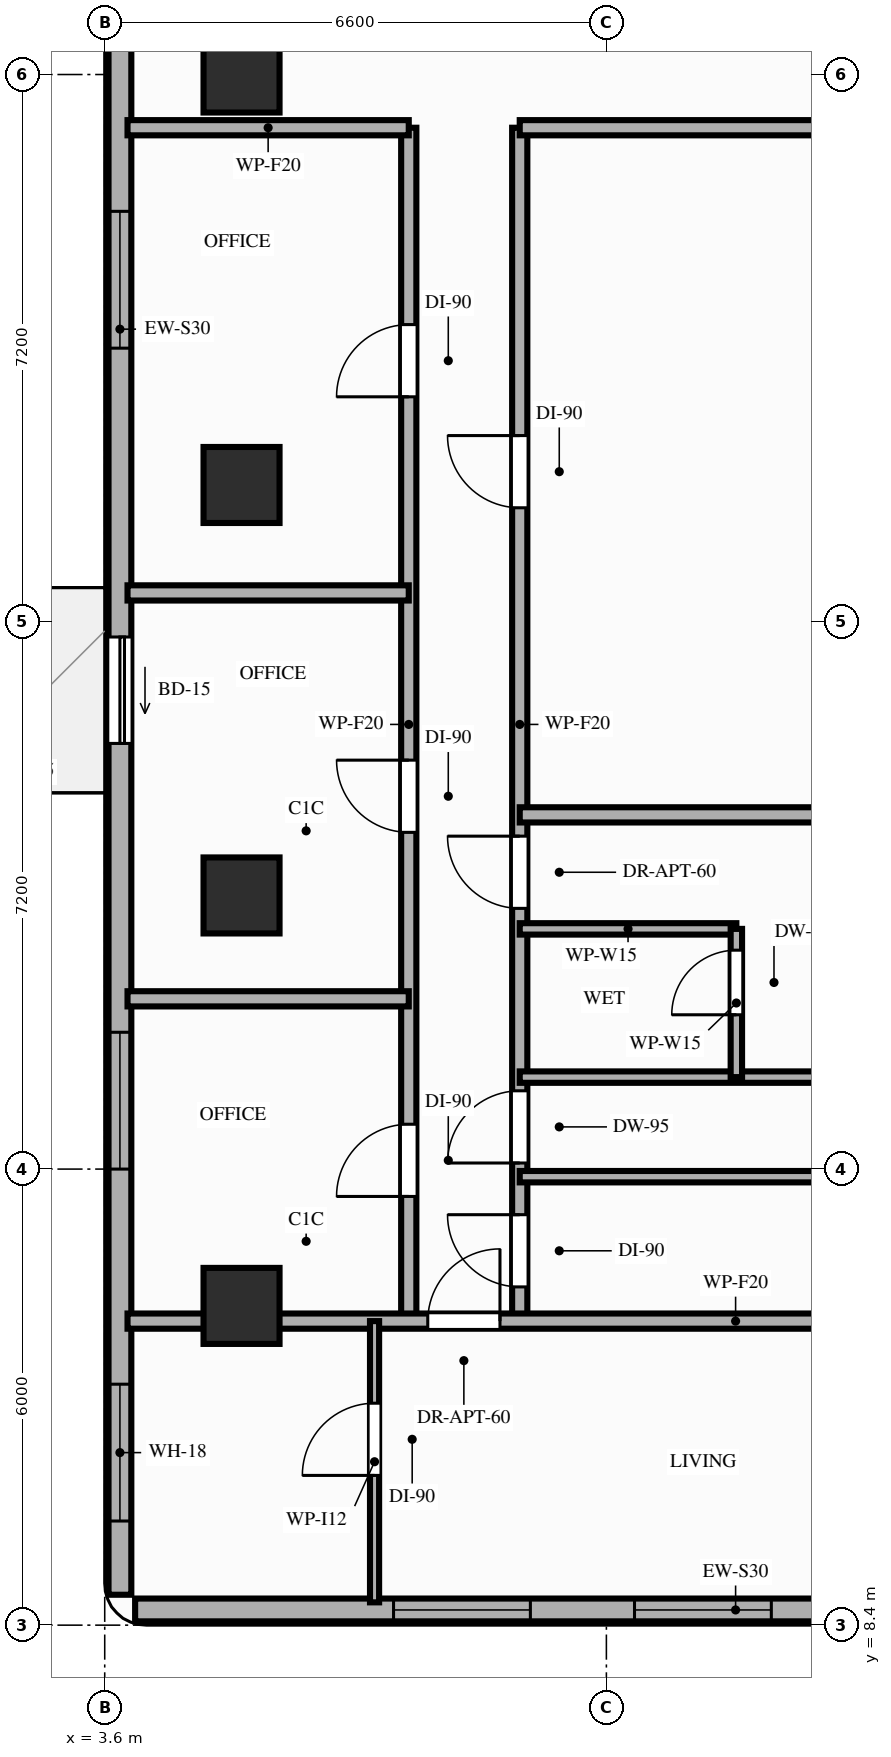
"""IFC4 building model, lengths in metres.
Left out: names, types, materials, properties, quantities, classifications, styles, units other than length and angle.
Written with IfcOpenShell. Run it as: python <this file> out.ifc"""

import sys

from ifc_helpers import new_model, si_unit, direction, frame, frame_2d, origin, origin_2d, place, context, subcontext, project, spatial, rectangle, extrude, element, fill, save


model = new_model("IFC4")
c1 = context("Model", 3, precision=1e-05, world=origin(), true_north=direction((0.0, 1.0)))
c2 = subcontext(c1, "Body", "Model", "MODEL_VIEW")
j1 = project(units=[si_unit("LENGTHUNIT", "METRE"), si_unit("PLANEANGLEUNIT", "RADIAN")], contexts=[c1])
p1 = place(None, origin())
s1 = spatial("IfcSite", under=j1, at=p1, CompositionType="ELEMENT")
p2 = place(p1, origin())
s2 = spatial("IfcBuilding", under=s1, at=p2, CompositionType="ELEMENT")
p3 = place(p2, frame((0.0, 0.0, 126.6)))
s3 = spatial("IfcBuildingStorey", under=s2, at=p3, CompositionType="ELEMENT", Elevation=126.6)
for number, where, z_axis, x_axis in (
    (1, (5.4, 12.6, 0.0), (0.0, 0.0, 1.0), (1.0, 0.0, 0.0)),
    (2, (5.4, 18.0, 0.0), (0.0, 0.0, 1.0), (1.0, 0.0, 0.0)),
    (3, (5.4, 23.4, 0.0), (0.0, 0.0, 1.0), (1.0, 0.0, 0.0)),
    (4, (5.4, 28.8, 0.0), (0.0, 0.0, 1.0), (1.0, 0.0, 0.0)),
):
    element("IfcColumn", number, at=place(p3, frame(where, z_axis=z_axis, x_axis=x_axis)), inside=s3, PredefinedType="COLUMN", context=c2, shape_type="SweptSolid", body=[
        extrude(rectangle(XDim=1.0, YDim=1.0, at=origin_2d()), origin(), (0.0, 0.0, 1.0), 3.2),
    ])
p4 = place(p3, frame((4.0, 8.6, 0.0), z_axis=(0.0, 0.0, 1.0), x_axis=(1.0, 0.0, 0.0)))
e5 = element("IfcWall", 5, at=p4, inside=s3, PredefinedType="STANDARD", context=c2, shape_type="SweptSolid", body=[
    extrude(rectangle(XDim=15.8, YDim=0.3, at=frame_2d((7.9, 0.0))), origin(), (0.0, 0.0, 1.0), 3.02),
])
p5 = place(p4, frame((6.57, 0.0, 0.85)))
e6 = element("IfcOpeningElement", 6, at=p5, cuts=e5, PredefinedType="OPENING", context=c2, shape_type="SweptSolid", body=[
    extrude(rectangle(XDim=1.8, YDim=1.75, at=frame_2d((0.9, 0.875))), frame((0.0, 0.16, 0.0), z_axis=(0.0, -1.0, 0.0), x_axis=(1.0, 0.0, 0.0)), (0.0, 0.0, 1.0), 0.32),
])
p6 = place(p4, frame((3.4, 0.0, 0.85)))
e7 = element("IfcOpeningElement", 7, at=p6, cuts=e5, PredefinedType="OPENING", context=c2, shape_type="SweptSolid", body=[
    extrude(rectangle(XDim=1.8, YDim=1.75, at=frame_2d((0.9, 0.875))), frame((0.0, 0.16, 0.0), z_axis=(0.0, -1.0, 0.0), x_axis=(1.0, 0.0, 0.0)), (0.0, 0.0, 1.0), 0.32),
])
p7 = place(p3, frame((3.8, 42.1, 0.0), z_axis=(0.0, 0.0, 1.0), x_axis=(0.0, -1.0, 0.0)))
e8 = element("IfcWall", 8, at=p7, inside=s3, PredefinedType="STANDARD", context=c2, shape_type="SweptSolid", body=[
    extrude(rectangle(XDim=33.3, YDim=0.3, at=frame_2d((16.65, 0.0))), origin(), (0.0, 0.0, 1.0), 2.71),
])
p8 = place(p7, frame((20.7, 0.0, 0.0)))
e9 = element("IfcOpeningElement", 9, at=p8, cuts=e8, PredefinedType="OPENING", context=c2, shape_type="SweptSolid", body=[
    extrude(rectangle(XDim=1.4, YDim=2.1, at=frame_2d((0.7, 1.05))), frame((0.0, 0.16, 0.0), z_axis=(0.0, -1.0, 0.0), x_axis=(1.0, 0.0, 0.0)), (0.0, 0.0, 1.0), 0.32),
])
p9 = place(p7, frame((30.53, 0.0, 0.85)))
e10 = element("IfcOpeningElement", 10, at=p9, cuts=e8, PredefinedType="OPENING", context=c2, shape_type="SweptSolid", body=[
    extrude(rectangle(XDim=1.8, YDim=1.61, at=frame_2d((0.9, 0.805))), frame((0.0, 0.16, 0.0), z_axis=(0.0, -1.0, 0.0), x_axis=(1.0, 0.0, 0.0)), (0.0, 0.0, 1.0), 0.32),
])
p10 = place(p7, frame((25.9, 0.0, 0.85)))
e11 = element("IfcOpeningElement", 11, at=p10, cuts=e8, PredefinedType="OPENING", context=c2, shape_type="SweptSolid", body=[
    extrude(rectangle(XDim=1.8, YDim=1.61, at=frame_2d((0.9, 0.805))), frame((0.0, 0.16, 0.0), z_axis=(0.0, -1.0, 0.0), x_axis=(1.0, 0.0, 0.0)), (0.0, 0.0, 1.0), 0.32),
])
p11 = place(p7, frame((15.1, 0.0, 0.85)))
e12 = element("IfcOpeningElement", 12, at=p11, cuts=e8, PredefinedType="OPENING", context=c2, shape_type="SweptSolid", body=[
    extrude(rectangle(XDim=1.8, YDim=1.61, at=frame_2d((0.9, 0.805))), frame((0.0, 0.16, 0.0), z_axis=(0.0, -1.0, 0.0), x_axis=(1.0, 0.0, 0.0)), (0.0, 0.0, 1.0), 0.32),
])
p12 = place(p7, frame((9.9, 0.0, 0.85)))
e13 = element("IfcOpeningElement", 13, at=p12, cuts=e8, PredefinedType="OPENING", context=c2, shape_type="SweptSolid", body=[
    extrude(rectangle(XDim=1.8, YDim=1.61, at=frame_2d((0.9, 0.805))), frame((0.0, 0.16, 0.0), z_axis=(0.0, -1.0, 0.0), x_axis=(1.0, 0.0, 0.0)), (0.0, 0.0, 1.0), 0.32),
])
p13 = place(p7, frame((3.8, 0.0, 0.85)))
e14 = element("IfcOpeningElement", 14, at=p13, cuts=e8, PredefinedType="OPENING", context=c2, shape_type="SweptSolid", body=[
    extrude(rectangle(XDim=1.8, YDim=1.61, at=frame_2d((0.9, 0.805))), frame((0.0, 0.16, 0.0), z_axis=(0.0, -1.0, 0.0), x_axis=(1.0, 0.0, 0.0)), (0.0, 0.0, 1.0), 0.32),
])
p14 = place(p3, frame((7.6, 12.4, 0.0), z_axis=(0.0, 0.0, 1.0), x_axis=(0.0, 1.0, 0.0)))
e15 = element("IfcWall", 15, at=p14, inside=s3, PredefinedType="PARTITIONING", context=c2, shape_type="SweptSolid", body=[
    extrude(rectangle(XDim=15.7, YDim=0.2, at=frame_2d((7.85, 0.0))), origin(), (0.0, 0.0, 1.0), 2.45),
])
p15 = place(p14, frame((1.64, 0.0, 0.0)))
e16 = element("IfcOpeningElement", 16, at=p15, cuts=e15, PredefinedType="OPENING", context=c2, shape_type="SweptSolid", body=[
    extrude(rectangle(XDim=0.95, YDim=2.15, at=frame_2d((0.475, 1.075))), frame((0.0, 0.11, 0.0), z_axis=(0.0, -1.0, 0.0), x_axis=(1.0, 0.0, 0.0)), (0.0, 0.0, 1.0), 0.22),
])
p16 = place(p14, frame((6.43, 0.0, 0.0)))
e17 = element("IfcOpeningElement", 17, at=p16, cuts=e15, PredefinedType="OPENING", context=c2, shape_type="SweptSolid", body=[
    extrude(rectangle(XDim=0.95, YDim=2.15, at=frame_2d((0.475, 1.075))), frame((0.0, 0.11, 0.0), z_axis=(0.0, -1.0, 0.0), x_axis=(1.0, 0.0, 0.0)), (0.0, 0.0, 1.0), 0.22),
])
p17 = place(p14, frame((12.16, 0.0, 0.0)))
e18 = element("IfcOpeningElement", 18, at=p17, cuts=e15, PredefinedType="OPENING", context=c2, shape_type="SweptSolid", body=[
    extrude(rectangle(XDim=0.95, YDim=2.15, at=frame_2d((0.475, 1.075))), frame((0.0, 0.11, 0.0), z_axis=(0.0, -1.0, 0.0), x_axis=(1.0, 0.0, 0.0)), (0.0, 0.0, 1.0), 0.22),
])
p18 = place(p3, frame((9.06, 12.4, 0.0), z_axis=(0.0, 0.0, 1.0), x_axis=(0.0, 1.0, 0.0)))
e19 = element("IfcWall", 19, at=p18, inside=s3, PredefinedType="PARTITIONING", context=c2, shape_type="SweptSolid", body=[
    extrude(rectangle(XDim=15.7, YDim=0.2, at=frame_2d((7.85, 0.0))), origin(), (0.0, 0.0, 1.0), 2.45),
])
p19 = place(p18, frame((0.45, 0.0, 0.0)))
e20 = element("IfcOpeningElement", 20, at=p19, cuts=e19, PredefinedType="OPENING", context=c2, shape_type="SweptSolid", body=[
    extrude(rectangle(XDim=0.95, YDim=2.15, at=frame_2d((0.475, 1.075))), frame((0.0, 0.11, 0.0), z_axis=(0.0, -1.0, 0.0), x_axis=(1.0, 0.0, 0.0)), (0.0, 0.0, 1.0), 0.22),
])
p20 = place(p18, frame((2.08, 0.0, 0.0)))
e21 = element("IfcOpeningElement", 21, at=p20, cuts=e19, PredefinedType="OPENING", context=c2, shape_type="SweptSolid", body=[
    extrude(rectangle(XDim=0.95, YDim=2.1, at=frame_2d((0.475, 1.05))), frame((0.0, 0.11, 0.0), z_axis=(0.0, -1.0, 0.0), x_axis=(1.0, 0.0, 0.0)), (0.0, 0.0, 1.0), 0.22),
])
p21 = place(p18, frame((10.7, 0.0, 0.0)))
e22 = element("IfcOpeningElement", 22, at=p21, cuts=e19, PredefinedType="OPENING", context=c2, shape_type="SweptSolid", body=[
    extrude(rectangle(XDim=0.95, YDim=2.15, at=frame_2d((0.475, 1.075))), frame((0.0, 0.11, 0.0), z_axis=(0.0, -1.0, 0.0), x_axis=(1.0, 0.0, 0.0)), (0.0, 0.0, 1.0), 0.22),
])
p22 = place(p18, frame((5.43, 0.0, 0.0)))
e23 = element("IfcOpeningElement", 23, at=p22, cuts=e19, PredefinedType="OPENING", context=c2, shape_type="SweptSolid", body=[
    extrude(rectangle(XDim=0.95, YDim=2.15, at=frame_2d((0.475, 1.075))), frame((0.0, 0.11, 0.0), z_axis=(0.0, -1.0, 0.0), x_axis=(1.0, 0.0, 0.0)), (0.0, 0.0, 1.0), 0.22),
])
p23 = place(p3, frame((3.9, 12.4, 0.0), z_axis=(0.0, 0.0, 1.0), x_axis=(1.0, 0.0, 0.0)))
e24 = element("IfcWall", 24, at=p23, inside=s3, PredefinedType="PARTITIONING", context=c2, shape_type="SweptSolid", body=[
    extrude(rectangle(XDim=16.0, YDim=0.2, at=frame_2d((8.0, 0.0))), origin(), (0.0, 0.0, 1.0), 2.45),
])
p24 = place(p23, frame((3.95, 0.0, 0.0)))
e25 = element("IfcOpeningElement", 25, at=p24, cuts=e24, PredefinedType="OPENING", context=c2, shape_type="SweptSolid", body=[
    extrude(rectangle(XDim=0.95, YDim=2.15, at=frame_2d((0.475, 1.075))), frame((0.0, 0.11, 0.0), z_axis=(0.0, -1.0, 0.0), x_axis=(1.0, 0.0, 0.0)), (0.0, 0.0, 1.0), 0.22),
])
p25 = place(p3, frame((3.9, 28.1, 0.0), z_axis=(0.0, 0.0, 1.0), x_axis=(1.0, 0.0, 0.0)))
e26 = element("IfcWall", 26, at=p25, inside=s3, PredefinedType="PARTITIONING", context=c2, shape_type="SweptSolid", body=[
    extrude(rectangle(XDim=3.7, YDim=0.2, at=frame_2d((1.85, 0.0))), origin(), (0.0, 0.0, 1.0), 2.45),
])
p26 = place(p3, frame((9.06, 28.1, 0.0), z_axis=(0.0, 0.0, 1.0), x_axis=(1.0, 0.0, 0.0)))
e27 = element("IfcWall", 27, at=p26, inside=s3, PredefinedType="PARTITIONING", context=c2, shape_type="SweptSolid", body=[
    extrude(rectangle(XDim=10.84, YDim=0.2, at=frame_2d((5.42, 0.0))), origin(), (0.0, 0.0, 1.0), 2.45),
])
for number, where, z_axis, x_axis in (
    (28, (3.9, 16.64, 0.0), (0.0, 0.0, 1.0), (1.0, 0.0, 0.0)),
    (29, (3.9, 21.98, 0.0), (0.0, 0.0, 1.0), (1.0, 0.0, 0.0)),
):
    element("IfcWall", number, at=place(p3, frame(where, z_axis=z_axis, x_axis=x_axis)), inside=s3, PredefinedType="PARTITIONING", context=c2, shape_type="SweptSolid", body=[
        extrude(rectangle(XDim=3.7, YDim=0.2, at=frame_2d((1.85, 0.0))), origin(), (0.0, 0.0, 1.0), 2.45),
    ])
p27 = place(p3, frame((7.15, 8.7, 0.0), z_axis=(0.0, 0.0, 1.0), x_axis=(0.0, 1.0, 0.0)))
e30 = element("IfcWall", 30, at=p27, inside=s3, PredefinedType="PARTITIONING", context=c2, shape_type="SweptSolid", body=[
    extrude(rectangle(XDim=3.7, YDim=0.12, at=frame_2d((1.85, 0.0))), origin(), (0.0, 0.0, 1.0), 2.45),
])
p28 = place(p27, frame((1.67, 0.0, 0.0)))
e31 = element("IfcOpeningElement", 31, at=p28, cuts=e30, PredefinedType="OPENING", context=c2, shape_type="SweptSolid", body=[
    extrude(rectangle(XDim=0.95, YDim=2.15, at=frame_2d((0.475, 1.075))), frame((0.0, 0.07, 0.0), z_axis=(0.0, -1.0, 0.0), x_axis=(1.0, 0.0, 0.0)), (0.0, 0.0, 1.0), 0.14),
])
for number, where, z_axis, x_axis in (
    (32, (9.06, 14.3, 0.0), (0.0, 0.0, 1.0), (1.0, 0.0, 0.0)),
    (33, (9.06, 15.61, 0.0), (0.0, 0.0, 1.0), (1.0, 0.0, 0.0)),
):
    element("IfcWall", number, at=place(p3, frame(where, z_axis=z_axis, x_axis=x_axis)), inside=s3, PredefinedType="PARTITIONING", context=c2, shape_type="SweptSolid", body=[
        extrude(rectangle(XDim=10.84, YDim=0.15, at=frame_2d((5.42, 0.0))), origin(), (0.0, 0.0, 1.0), 2.45),
    ])
p29 = place(p3, frame((9.06, 19.06, 0.0), z_axis=(0.0, 0.0, 1.0), x_axis=(1.0, 0.0, 0.0)))
e34 = element("IfcWall", 34, at=p29, inside=s3, PredefinedType="PARTITIONING", context=c2, shape_type="SweptSolid", body=[
    extrude(rectangle(XDim=10.84, YDim=0.2, at=frame_2d((5.42, 0.0))), origin(), (0.0, 0.0, 1.0), 2.45),
])
p30 = place(p3, frame((9.06, 17.56, 0.0), z_axis=(0.0, 0.0, 1.0), x_axis=(1.0, 0.0, 0.0)))
e35 = element("IfcWall", 35, at=p30, inside=s3, PredefinedType="PARTITIONING", context=c2, shape_type="SweptSolid", body=[
    extrude(rectangle(XDim=2.85, YDim=0.15, at=frame_2d((1.425, 0.0))), origin(), (0.0, 0.0, 1.0), 3.02),
])
p31 = place(p3, frame((11.91, 15.61, 0.0), z_axis=(0.0, 0.0, 1.0), x_axis=(0.0, 1.0, 0.0)))
e36 = element("IfcWall", 36, at=p31, inside=s3, PredefinedType="PARTITIONING", context=c2, shape_type="SweptSolid", body=[
    extrude(rectangle(XDim=1.95, YDim=0.15, at=frame_2d((0.975, 0.0))), origin(), (0.0, 0.0, 1.0), 2.71),
])
p32 = place(p31, frame((0.82, 0.0, 0.0)))
e37 = element("IfcOpeningElement", 37, at=p32, cuts=e36, PredefinedType="OPENING", context=c2, shape_type="SweptSolid", body=[
    extrude(rectangle(XDim=0.85, YDim=2.1, at=frame_2d((0.425, 1.05))), frame((0.0, 0.085, 0.0), z_axis=(0.0, -1.0, 0.0), x_axis=(1.0, 0.0, 0.0)), (0.0, 0.0, 1.0), 0.17),
])
p33 = place(p8, origin())
e38 = element("IfcDoor", 38, at=p33, inside=s3, OperationType="SLIDING_TO_RIGHT", PredefinedType="DOOR", context=c2, shape_type="SweptSolid", body=[
    extrude(rectangle(XDim=1.4, YDim=2.1, at=frame_2d((0.7, 1.05))), frame((0.0, 0.025, 0.0), z_axis=(0.0, -1.0, 0.0), x_axis=(1.0, 0.0, 0.0)), (0.0, 0.0, 1.0), 0.05),
])
fill(e9, e38)
p34 = place(p9, origin())
e39 = element("IfcWindow", 39, at=p34, inside=s3, PartitioningType="SINGLE_PANEL", PredefinedType="WINDOW", context=c2, shape_type="SweptSolid", body=[
    extrude(rectangle(XDim=1.8, YDim=1.61, at=frame_2d((0.9, 0.805))), frame((0.0, 0.03, 0.0), z_axis=(0.0, -1.0, 0.0), x_axis=(1.0, 0.0, 0.0)), (0.0, 0.0, 1.0), 0.06),
])
fill(e10, e39)
p35 = place(p5, origin())
e40 = element("IfcWindow", 40, at=p35, inside=s3, PartitioningType="SINGLE_PANEL", PredefinedType="WINDOW", context=c2, shape_type="SweptSolid", body=[
    extrude(rectangle(XDim=1.8, YDim=1.75, at=frame_2d((0.9, 0.875))), frame((0.0, 0.03, 0.0), z_axis=(0.0, -1.0, 0.0), x_axis=(1.0, 0.0, 0.0)), (0.0, 0.0, 1.0), 0.06),
])
fill(e6, e40)
p36 = place(p10, origin())
e41 = element("IfcWindow", 41, at=p36, inside=s3, PartitioningType="SINGLE_PANEL", PredefinedType="WINDOW", context=c2, shape_type="SweptSolid", body=[
    extrude(rectangle(XDim=1.8, YDim=1.61, at=frame_2d((0.9, 0.805))), frame((0.0, 0.03, 0.0), z_axis=(0.0, -1.0, 0.0), x_axis=(1.0, 0.0, 0.0)), (0.0, 0.0, 1.0), 0.06),
])
fill(e11, e41)
p37 = place(p11, origin())
e42 = element("IfcWindow", 42, at=p37, inside=s3, PartitioningType="SINGLE_PANEL", PredefinedType="WINDOW", context=c2, shape_type="SweptSolid", body=[
    extrude(rectangle(XDim=1.8, YDim=1.61, at=frame_2d((0.9, 0.805))), frame((0.0, 0.03, 0.0), z_axis=(0.0, -1.0, 0.0), x_axis=(1.0, 0.0, 0.0)), (0.0, 0.0, 1.0), 0.06),
])
fill(e12, e42)
p38 = place(p6, origin())
e43 = element("IfcWindow", 43, at=p38, inside=s3, PartitioningType="SINGLE_PANEL", PredefinedType="WINDOW", context=c2, shape_type="SweptSolid", body=[
    extrude(rectangle(XDim=1.8, YDim=1.75, at=frame_2d((0.9, 0.875))), frame((0.0, 0.03, 0.0), z_axis=(0.0, -1.0, 0.0), x_axis=(1.0, 0.0, 0.0)), (0.0, 0.0, 1.0), 0.06),
])
fill(e7, e43)
p39 = place(p15, origin())
e44 = element("IfcDoor", 44, at=p39, inside=s3, OperationType="SINGLE_SWING_LEFT", PredefinedType="DOOR", context=c2, shape_type="SweptSolid", body=[
    extrude(rectangle(XDim=0.95, YDim=2.15, at=frame_2d((0.475, 1.075))), frame((0.0, 0.025, 0.0), z_axis=(0.0, -1.0, 0.0), x_axis=(1.0, 0.0, 0.0)), (0.0, 0.0, 1.0), 0.05),
])
fill(e16, e44)
p40 = place(p16, origin())
e45 = element("IfcDoor", 45, at=p40, inside=s3, OperationType="SINGLE_SWING_RIGHT", PredefinedType="DOOR", context=c2, shape_type="SweptSolid", body=[
    extrude(rectangle(XDim=0.95, YDim=2.15, at=frame_2d((0.475, 1.075))), frame((0.0, 0.025, 0.0), z_axis=(0.0, -1.0, 0.0), x_axis=(1.0, 0.0, 0.0)), (0.0, 0.0, 1.0), 0.05),
])
fill(e17, e45)
p41 = place(p17, origin())
e46 = element("IfcDoor", 46, at=p41, inside=s3, OperationType="SINGLE_SWING_LEFT", PredefinedType="DOOR", context=c2, shape_type="SweptSolid", body=[
    extrude(rectangle(XDim=0.95, YDim=2.15, at=frame_2d((0.475, 1.075))), frame((0.0, 0.025, 0.0), z_axis=(0.0, -1.0, 0.0), x_axis=(1.0, 0.0, 0.0)), (0.0, 0.0, 1.0), 0.05),
])
fill(e18, e46)
p42 = place(p24, origin())
e47 = element("IfcDoor", 47, at=p42, inside=s3, OperationType="SINGLE_SWING_RIGHT", PredefinedType="DOOR", context=c2, shape_type="SweptSolid", body=[
    extrude(rectangle(XDim=0.95, YDim=2.15, at=frame_2d((0.475, 1.075))), frame((0.0, 0.025, 0.0), z_axis=(0.0, -1.0, 0.0), x_axis=(1.0, 0.0, 0.0)), (0.0, 0.0, 1.0), 0.05),
])
fill(e25, e47)
p43 = place(p28, origin())
e48 = element("IfcDoor", 48, at=p43, inside=s3, OperationType="SINGLE_SWING_LEFT", PredefinedType="DOOR", context=c2, shape_type="SweptSolid", body=[
    extrude(rectangle(XDim=0.95, YDim=2.15, at=frame_2d((0.475, 1.075))), frame((0.0, 0.025, 0.0), z_axis=(0.0, -1.0, 0.0), x_axis=(1.0, 0.0, 0.0)), (0.0, 0.0, 1.0), 0.05),
])
fill(e31, e48)
p44 = place(p19, origin())
e49 = element("IfcDoor", 49, at=p44, inside=s3, OperationType="SINGLE_SWING_RIGHT", PredefinedType="DOOR", context=c2, shape_type="SweptSolid", body=[
    extrude(rectangle(XDim=0.95, YDim=2.15, at=frame_2d((0.475, 1.075))), frame((0.0, 0.025, 0.0), z_axis=(0.0, -1.0, 0.0), x_axis=(1.0, 0.0, 0.0)), (0.0, 0.0, 1.0), 0.05),
])
fill(e20, e49)
p45 = place(p20, origin())
e50 = element("IfcDoor", 50, at=p45, inside=s3, OperationType="SINGLE_SWING_LEFT", PredefinedType="DOOR", context=c2, shape_type="SweptSolid", body=[
    extrude(rectangle(XDim=0.95, YDim=2.1, at=frame_2d((0.475, 1.05))), frame((0.0, 0.025, 0.0), z_axis=(0.0, -1.0, 0.0), x_axis=(1.0, 0.0, 0.0)), (0.0, 0.0, 1.0), 0.05),
])
fill(e21, e50)
p46 = place(p21, origin())
e51 = element("IfcDoor", 51, at=p46, inside=s3, OperationType="SINGLE_SWING_RIGHT", PredefinedType="DOOR", context=c2, shape_type="SweptSolid", body=[
    extrude(rectangle(XDim=0.95, YDim=2.15, at=frame_2d((0.475, 1.075))), frame((0.0, 0.025, 0.0), z_axis=(0.0, -1.0, 0.0), x_axis=(1.0, 0.0, 0.0)), (0.0, 0.0, 1.0), 0.05),
])
fill(e22, e51)
p47 = place(p32, origin())
e52 = element("IfcDoor", 52, at=p47, inside=s3, OperationType="SINGLE_SWING_LEFT", PredefinedType="DOOR", context=c2, shape_type="SweptSolid", body=[
    extrude(rectangle(XDim=0.85, YDim=2.1, at=frame_2d((0.425, 1.05))), frame((0.0, 0.025, 0.0), z_axis=(0.0, -1.0, 0.0), x_axis=(1.0, 0.0, 0.0)), (0.0, 0.0, 1.0), 0.05),
])
fill(e37, e52)
p48 = place(p22, origin())
e53 = element("IfcDoor", 53, at=p48, inside=s3, OperationType="SINGLE_SWING_RIGHT", PredefinedType="DOOR", context=c2, shape_type="SweptSolid", body=[
    extrude(rectangle(XDim=0.95, YDim=2.15, at=frame_2d((0.475, 1.075))), frame((0.0, 0.025, 0.0), z_axis=(0.0, -1.0, 0.0), x_axis=(1.0, 0.0, 0.0)), (0.0, 0.0, 1.0), 0.05),
])
fill(e23, e53)
save(model, sys.argv[1])
